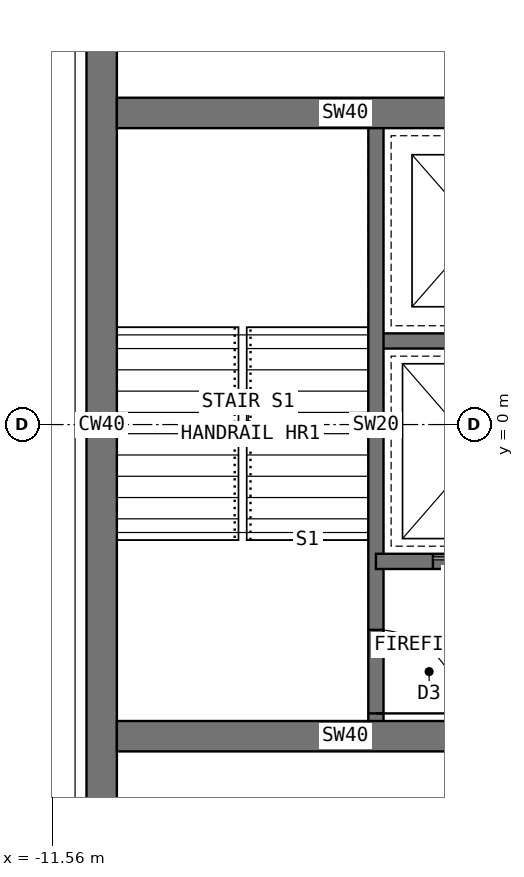
"""IFC4 building model, lengths in metres.
Left out: names, types, materials, properties, quantities, classifications, styles, units other than length and angle.
Written with IfcOpenShell. Run it as: python <this file> out.ifc"""

import sys

from ifc_helpers import new_model, si_unit, direction, frame, frame_2d, origin, place, context, subcontext, project, spatial, rectangle, extrude, element, fill, save


model = new_model("IFC4")
c1 = context("Model", 3, precision=1e-05, world=origin(), true_north=direction((0.0, 1.0)))
c2 = subcontext(c1, "Body", "Model", "MODEL_VIEW")
j1 = project(units=[si_unit("LENGTHUNIT", "METRE"), si_unit("PLANEANGLEUNIT", "RADIAN")], contexts=[c1])
p1 = place(None, origin())
s1 = spatial("IfcSite", under=j1, at=p1, CompositionType="ELEMENT")
p2 = place(p1, origin())
s2 = spatial("IfcBuilding", under=s1, at=p2, CompositionType="ELEMENT")
p3 = place(p2, frame((0.0, 0.0, 243.5)))
s3 = spatial("IfcBuildingStorey", under=s2, at=p3, CompositionType="ELEMENT", Elevation=243.5)
p4 = place(p3, frame((-10.908, 6.298, 0.0), z_axis=(0.0, 0.0, 1.0), x_axis=(0.0, -1.0, 0.0)))
e1 = element("IfcWall", 1, at=p4, inside=s3, PredefinedType="SHEAR", context=c2, shape_type="SweptSolid", body=[
    extrude(rectangle(XDim=12.596, YDim=0.4, at=frame_2d((6.298, 0.0))), origin(), (0.0, 0.0, 1.0), 4.0),
])
p5 = place(p3, frame((-4.7, 1.1, 0.0), z_axis=(0.0, 0.0, 1.0), x_axis=(-1.0, 0.0, 0.0)))
e2 = element("IfcWall", 2, at=p5, inside=s3, PredefinedType="SHEAR", context=c2, shape_type="SweptSolid", body=[
    extrude(rectangle(XDim=2.6, YDim=0.2, at=frame_2d((1.3, 0.0))), origin(), (0.0, 0.0, 1.0), 4.0),
])
p6 = place(p3, frame((-4.7, -1.8, 0.0), z_axis=(0.0, 0.0, 1.0), x_axis=(-1.0, 0.0, 0.0)))
e3 = element("IfcWall", 3, at=p6, inside=s3, PredefinedType="SHEAR", context=c2, shape_type="SweptSolid", body=[
    extrude(rectangle(XDim=2.6, YDim=0.2, at=frame_2d((1.3, 0.0))), origin(), (0.0, 0.0, 1.0), 4.0),
])
p7 = place(p6, frame((0.55, 0.0, 0.0)))
e4 = element("IfcOpeningElement", 4, at=p7, cuts=e3, PredefinedType="OPENING", context=c2, shape_type="SweptSolid", body=[
    extrude(rectangle(XDim=1.3, YDim=2.2, at=frame_2d((0.65, 1.1))), frame((0.0, 0.11, 0.0), z_axis=(0.0, -1.0, 0.0), x_axis=(1.0, 0.0, 0.0)), (0.0, 0.0, 1.0), 0.22),
])
p8 = place(p3, frame((-7.3, 4.0, 0.0), z_axis=(0.0, 0.0, 1.0), x_axis=(0.0, -1.0, 0.0)))
e5 = element("IfcWall", 5, at=p8, inside=s3, PredefinedType="SHEAR", context=c2, shape_type="SweptSolid", body=[
    extrude(rectangle(XDim=8.0, YDim=0.2, at=frame_2d((4.0, 0.0))), origin(), (0.0, 0.0, 1.0), 4.0),
])
p9 = place(p8, frame((6.7, 0.0, 0.0)))
e6 = element("IfcOpeningElement", 6, at=p9, cuts=e5, PredefinedType="OPENING", context=c2, shape_type="SweptSolid", body=[
    extrude(rectangle(XDim=1.1, YDim=2.1, at=frame_2d((0.55, 1.05))), frame((0.0, 0.11, 0.0), z_axis=(0.0, -1.0, 0.0), x_axis=(1.0, 0.0, 0.0)), (0.0, 0.0, 1.0), 0.22),
])
for number, where, z_axis, x_axis in (
    (7, (-4.7, -4.1, 0.0), (0.0, 0.0, 1.0), (-1.0, 0.0, 0.0)),
    (8, (-4.7, 4.1, 0.0), (0.0, 0.0, 1.0), (-1.0, 0.0, 0.0)),
):
    element("IfcWall", number, at=place(p3, frame(where, z_axis=z_axis, x_axis=x_axis)), inside=s3, PredefinedType="SHEAR", context=c2, shape_type="SweptSolid", body=[
        extrude(rectangle(XDim=6.008, YDim=0.4, at=frame_2d((3.004, 0.0))), origin(), (0.0, 0.0, 1.0), 4.0),
    ])
p10 = place(p7, origin())
e9 = element("IfcDoor", 9, at=p10, inside=s3, OperationType="DOUBLE_DOOR_SLIDING", PredefinedType="DOOR", context=c2, shape_type="SweptSolid", body=[
    extrude(rectangle(XDim=1.3, YDim=2.2, at=frame_2d((0.65, 1.1))), frame((0.0, 0.025, 0.0), z_axis=(0.0, -1.0, 0.0), x_axis=(1.0, 0.0, 0.0)), (0.0, 0.0, 1.0), 0.05),
])
fill(e4, e9)
p11 = place(p9, origin())
e10 = element("IfcDoor", 10, at=p11, inside=s3, OperationType="SINGLE_SWING_RIGHT", PredefinedType="DOOR", context=c2, shape_type="SweptSolid", body=[
    extrude(rectangle(XDim=1.1, YDim=2.1, at=frame_2d((0.55, 1.05))), frame((0.0, 0.025, 0.0), z_axis=(0.0, -1.0, 0.0), x_axis=(1.0, 0.0, 0.0)), (0.0, 0.0, 1.0), 0.05),
])
fill(e6, e10)
save(model, sys.argv[1])
